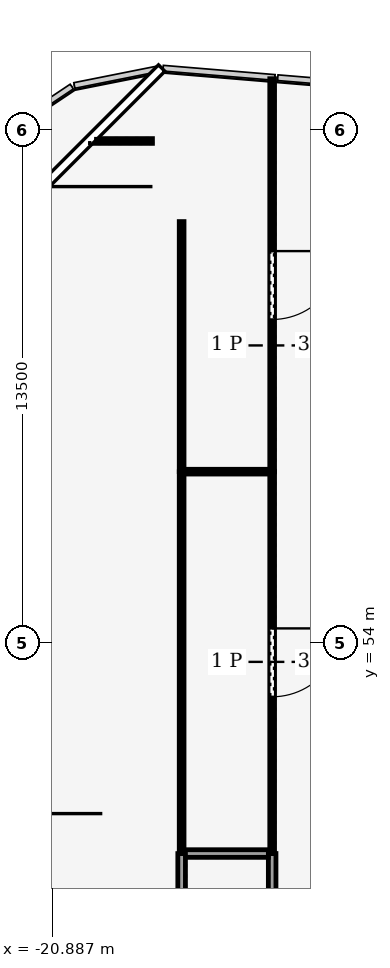
"""IFC4 building model, lengths in metres.
Left out: names, types, materials, properties, quantities, classifications, styles, units other than length and angle.
Written with IfcOpenShell. Run it as: python <this file> out.ifc"""

import sys

from ifc_helpers import new_model, si_unit, direction, frame, frame_2d, origin, origin_2d, place, context, subcontext, project, spatial, rectangle, hollow_rectangle, extrude, element, fill, save


model = new_model("IFC4")
c1 = context("Model", 3, precision=1e-05, world=origin(), true_north=direction((0.0, 1.0)))
c2 = subcontext(c1, "Body", "Model", "MODEL_VIEW")
j1 = project(units=[si_unit("LENGTHUNIT", "METRE"), si_unit("PLANEANGLEUNIT", "RADIAN")], contexts=[c1])
p1 = place(None, origin())
s1 = spatial("IfcSite", under=j1, at=p1, CompositionType="ELEMENT")
p2 = place(p1, origin())
s2 = spatial("IfcBuilding", under=s1, at=p2, CompositionType="ELEMENT")
p3 = place(p2, frame((0.0, 0.0, 282.0)))
s3 = spatial("IfcBuildingStorey", under=s2, at=p3, CompositionType="ELEMENT", Elevation=282.0)
p4 = place(p3, frame((-21.0, 66.0, 0.223), z_axis=(0.386877430339, 0.0, 0.922131147882), x_axis=(0.0, 1.0, 0.0)))
e1 = element("IfcColumn", 1, at=p4, inside=s3, PredefinedType="COLUMN", context=c2, shape_type="SweptSolid", body=[
    extrude(hollow_rectangle(XDim=1.0, YDim=1.0, WallThickness=0.045, at=origin_2d()), origin(), (0.0, 0.0, 1.0), 7.108),
])
p5 = place(p3, frame((-22.319, 49.5, 0.142), z_axis=(0.378894787682, 0.0, 0.925439754856), x_axis=(0.0, 1.0, 0.0)))
e2 = element("IfcColumn", 2, at=p5, inside=s3, PredefinedType="COLUMN", context=c2, shape_type="SweptSolid", body=[
    extrude(hollow_rectangle(XDim=0.6, YDim=0.6, WallThickness=0.025, at=origin_2d()), origin(), (0.0, 0.0, 1.0), 7.258),
])
p6 = place(p3, frame((-15.1, 48.449, 0.0), z_axis=(0.0, 0.0, 1.0), x_axis=(0.0, -1.0, 0.0)))
e3 = element("IfcWall", 3, at=p6, inside=s3, PredefinedType="PARTITIONING", context=c2, shape_type="SweptSolid", body=[
    extrude(rectangle(XDim=9.949, YDim=0.2, at=frame_2d((4.975, 0.0))), origin(), (0.0, 0.0, 1.0), 6.14),
])
p7 = place(p6, frame((4.475, 0.0, 0.0)))
e4 = element("IfcOpeningElement", 4, at=p7, cuts=e3, PredefinedType="OPENING", context=c2, shape_type="SweptSolid", body=[
    extrude(rectangle(XDim=1.0, YDim=2.1, at=frame_2d((0.5, 1.05))), frame((0.0, 0.11, 0.0), z_axis=(0.0, -1.0, 0.0), x_axis=(1.0, 0.0, 0.0)), (0.0, 0.0, 1.0), 0.22),
])
p8 = place(p3, frame((-15.1, 58.498, 0.0), z_axis=(0.0, 0.0, 1.0), x_axis=(0.0, -1.0, 0.0)))
e5 = element("IfcWall", 5, at=p8, inside=s3, PredefinedType="PARTITIONING", context=c2, shape_type="SweptSolid", body=[
    extrude(rectangle(XDim=10.049, YDim=0.125, at=frame_2d((5.024, 0.0))), origin(), (0.0, 0.0, 1.0), 6.35),
])
p9 = place(p8, frame((4.125, 0.0, 0.0)))
e6 = element("IfcOpeningElement", 6, at=p9, cuts=e5, PredefinedType="OPENING", context=c2, shape_type="SweptSolid", body=[
    extrude(rectangle(XDim=1.8, YDim=2.4, at=frame_2d((0.9, 1.2))), frame((0.0, 0.073, 0.0), z_axis=(0.0, -1.0, 0.0), x_axis=(1.0, 0.0, 0.0)), (0.0, 0.0, 1.0), 0.145),
])
p10 = place(p3, frame((-15.1, 68.838, 0.0), z_axis=(0.0, 0.0, 1.0), x_axis=(0.0, -1.0, 0.0)))
e7 = element("IfcWall", 7, at=p10, inside=s3, PredefinedType="PARTITIONING", context=c2, shape_type="SweptSolid", body=[
    extrude(rectangle(XDim=10.34, YDim=0.125, at=frame_2d((5.17, 0.0))), origin(), (0.0, 0.0, 1.0), 6.04),
])
p11 = place(p10, frame((4.536, 0.0, 0.0)))
e8 = element("IfcOpeningElement", 8, at=p11, cuts=e7, PredefinedType="OPENING", context=c2, shape_type="SweptSolid", body=[
    extrude(rectangle(XDim=1.8, YDim=2.4, at=frame_2d((0.9, 1.2))), frame((0.0, 0.073, 0.0), z_axis=(0.0, -1.0, 0.0), x_axis=(1.0, 0.0, 0.0)), (0.0, 0.0, 1.0), 0.145),
])
p12 = place(p3, frame((-17.482, 48.449, 0.0), z_axis=(0.0, 0.0, 1.0), x_axis=(1.0, 0.0, 0.0)))
e9 = element("IfcWall", 9, at=p12, inside=s3, PredefinedType="PARTITIONING", context=c2, shape_type="SweptSolid", body=[
    extrude(rectangle(XDim=2.282, YDim=0.2, at=frame_2d((1.141, 0.0))), origin(), (0.0, 0.0, 1.0), 6.39),
])
p13 = place(p3, frame((-17.482, 58.498, 0.0), z_axis=(0.0, 0.0, 1.0), x_axis=(1.0, 0.0, 0.0)))
e10 = element("IfcWall", 10, at=p13, inside=s3, PredefinedType="PARTITIONING", context=c2, shape_type="SweptSolid", body=[
    extrude(rectangle(XDim=2.319, YDim=0.125, at=frame_2d((1.16, 0.0))), origin(), (0.0, 0.0, 1.0), 6.24),
])
p14 = place(p3, frame((-17.482, 42.171, 0.0), z_axis=(0.0, 0.0, 1.0), x_axis=(0.0, 1.0, 0.0)))
e11 = element("IfcWall", 11, at=p14, inside=s3, PredefinedType="PARTITIONING", context=c2, shape_type="SweptSolid", body=[
    extrude(rectangle(XDim=6.276, YDim=0.2, at=frame_2d((3.138, 0.0))), origin(), (0.0, 0.0, 1.0), 6.87),
])
p15 = place(p3, frame((-17.482, 48.451, 0.0), z_axis=(0.0, 0.0, 1.0), x_axis=(0.0, 1.0, 0.0)))
e12 = element("IfcWall", 12, at=p15, inside=s3, PredefinedType="PARTITIONING", context=c2, shape_type="SweptSolid", body=[
    extrude(rectangle(XDim=10.045, YDim=0.125, at=frame_2d((5.022, 0.0))), origin(), (0.0, 0.0, 1.0), 6.35),
])
p16 = place(p3, frame((-17.482, 58.5, 0.0), z_axis=(0.0, 0.0, 1.0), x_axis=(0.0, 1.0, 0.0)))
e13 = element("IfcWall", 13, at=p16, inside=s3, PredefinedType="PARTITIONING", context=c2, shape_type="SweptSolid", body=[
    extrude(rectangle(XDim=6.579, YDim=0.125, at=frame_2d((3.29, 0.0))), origin(), (0.0, 0.0, 1.0), 6.87),
])
p17 = place(p3, frame((-18.25, 67.2, 0.0), z_axis=(0.0, 0.0, 1.0), x_axis=(-1.0, 0.0, 0.0)))
e14 = element("IfcWall", 14, at=p17, inside=s3, PredefinedType="PARTITIONING", context=c2, shape_type="SweptSolid", body=[
    extrude(rectangle(XDim=1.65, YDim=0.125, at=frame_2d((0.825, 0.0))), origin(), (0.0, 0.0, 1.0), 6.87),
])
p18 = place(p9, origin())
e15 = element("IfcDoor", 15, at=p18, inside=s3, OperationType="DOUBLE_DOOR_SINGLE_SWING", PredefinedType="DOOR", context=c2, shape_type="SweptSolid", body=[
    extrude(rectangle(XDim=1.8, YDim=2.4, at=frame_2d((0.9, 1.2))), frame((0.0, 0.025, 0.0), z_axis=(0.0, -1.0, 0.0), x_axis=(1.0, 0.0, 0.0)), (0.0, 0.0, 1.0), 0.05),
])
fill(e6, e15)
p19 = place(p11, origin())
e16 = element("IfcDoor", 16, at=p19, inside=s3, OperationType="DOUBLE_DOOR_SINGLE_SWING", PredefinedType="DOOR", context=c2, shape_type="SweptSolid", body=[
    extrude(rectangle(XDim=1.8, YDim=2.4, at=frame_2d((0.9, 1.2))), frame((0.0, 0.025, 0.0), z_axis=(0.0, -1.0, 0.0), x_axis=(1.0, 0.0, 0.0)), (0.0, 0.0, 1.0), 0.05),
])
fill(e8, e16)
save(model, sys.argv[1])
